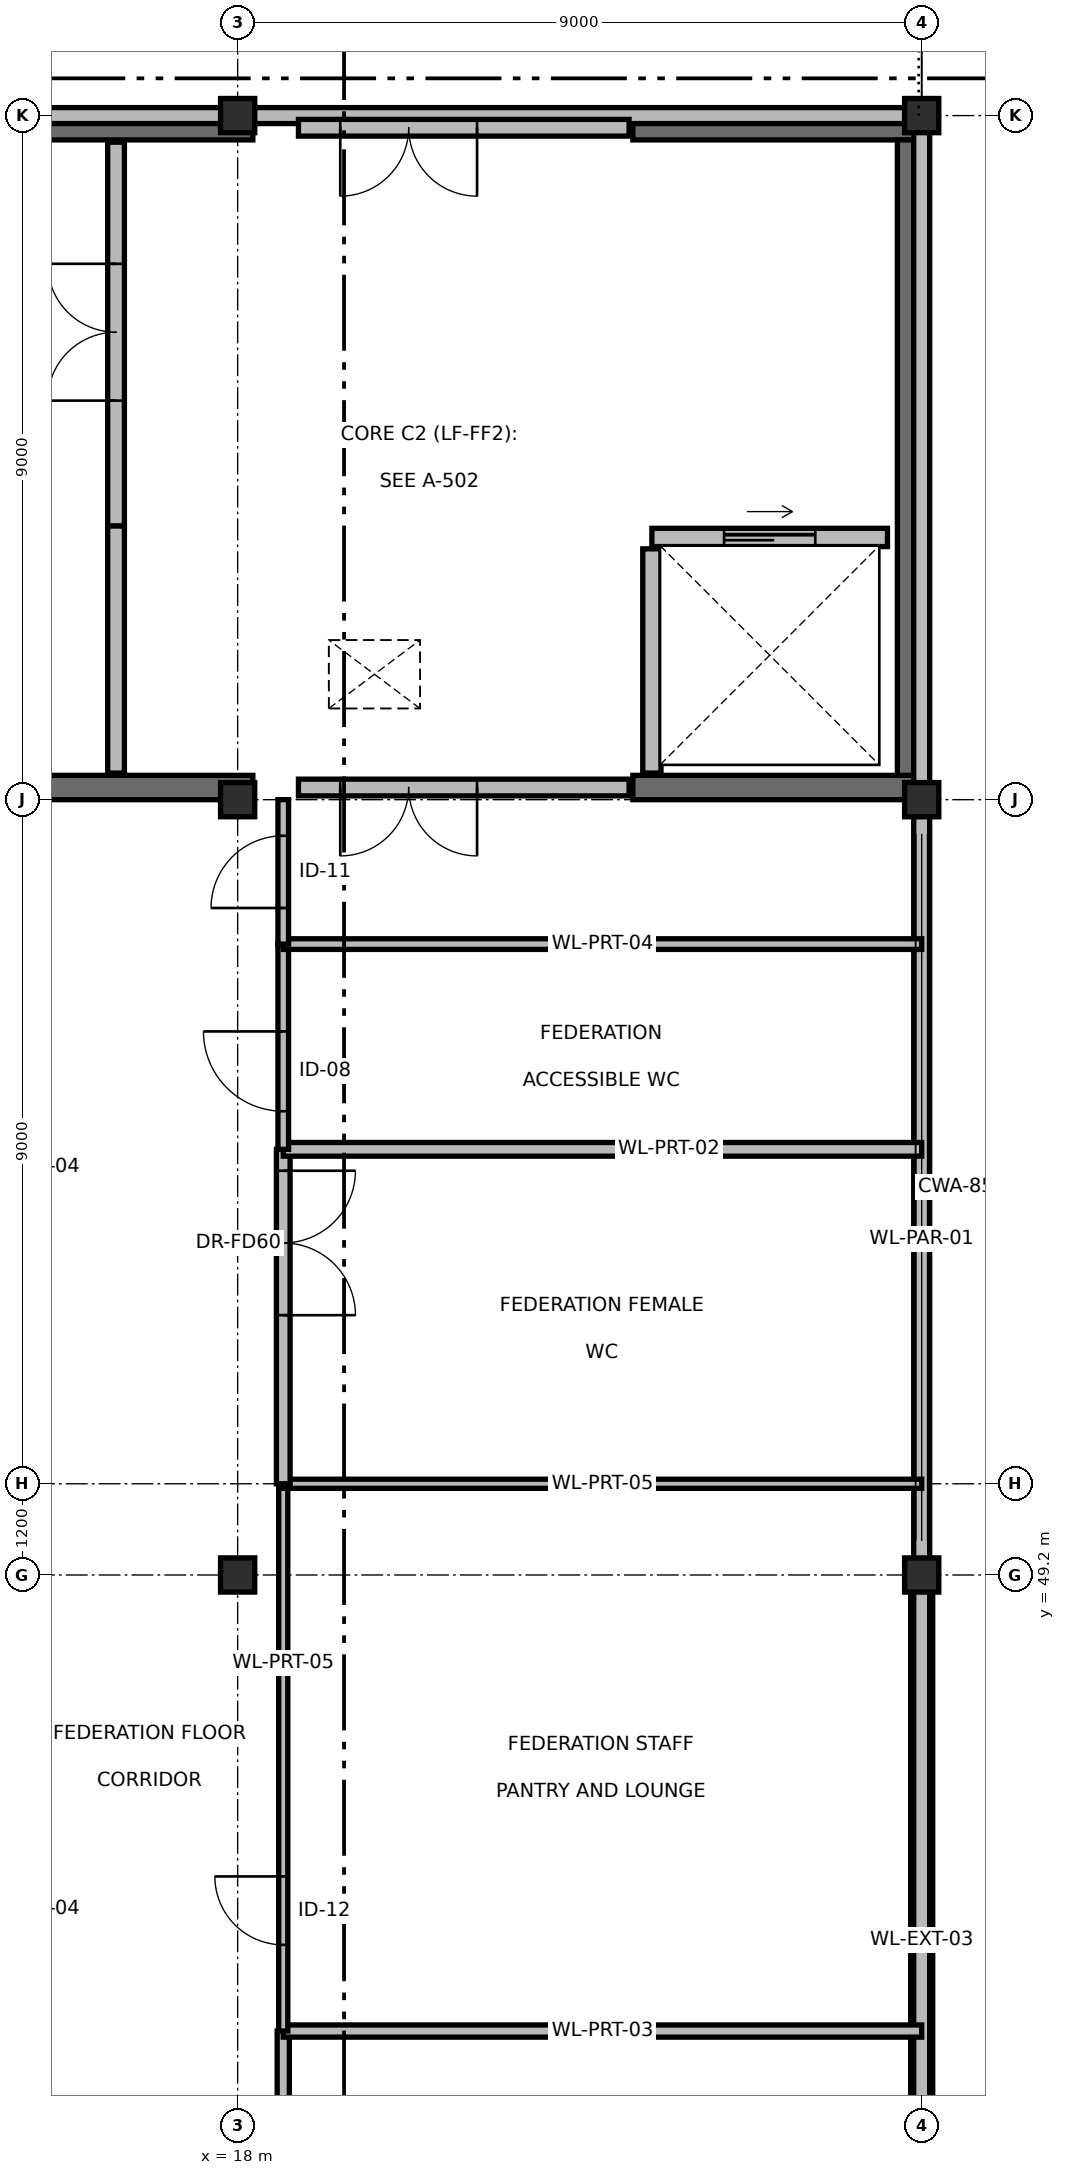
"""IFC4 building model, lengths in metres.
Left out: names, types, materials, properties, quantities, classifications, styles, units other than length and angle.
Written with IfcOpenShell. Run it as: python <this file> out.ifc"""

import sys

from ifc_helpers import new_model, si_unit, direction, frame, frame_2d, origin, origin_2d, place, context, subcontext, project, spatial, rectangle, extrude, element, fill, save


model = new_model("IFC4")
c1 = context("Model", 3, precision=1e-05, world=origin(), true_north=direction((0.0, 1.0)))
c2 = subcontext(c1, "Body", "Model", "MODEL_VIEW")
j1 = project(units=[si_unit("LENGTHUNIT", "METRE"), si_unit("PLANEANGLEUNIT", "RADIAN")], contexts=[c1])
p1 = place(None, origin())
s1 = spatial("IfcSite", under=j1, at=p1, CompositionType="ELEMENT")
p2 = place(p1, origin())
s2 = spatial("IfcBuilding", under=s1, at=p2, CompositionType="ELEMENT")
p3 = place(p2, frame((0.0, 0.0, 18.6)))
s3 = spatial("IfcBuildingStorey", under=s2, at=p3, CompositionType="ELEMENT", Elevation=18.6)
for number, where, z_axis, x_axis in (
    (1, (18.0, 49.2, 0.0), (0.0, 0.0, 1.0), (1.0, 0.0, 0.0)),
    (2, (18.0, 59.4, 0.0), (0.0, 0.0, 1.0), (1.0, 0.0, 0.0)),
    (3, (18.0, 68.4, 0.0), (0.0, 0.0, 1.0), (1.0, 0.0, 0.0)),
    (4, (27.0, 49.2, 0.0), (0.0, 0.0, 1.0), (1.0, 0.0, 0.0)),
    (5, (27.0, 59.4, 0.0), (0.0, 0.0, 1.0), (1.0, 0.0, 0.0)),
    (6, (27.0, 68.4, 0.0), (0.0, 0.0, 1.0), (1.0, 0.0, 0.0)),
):
    element("IfcColumn", number, at=place(p3, frame(where, z_axis=z_axis, x_axis=x_axis)), inside=s3, PredefinedType="COLUMN", context=c2, shape_type="SweptSolid", body=[
        extrude(rectangle(XDim=0.45, YDim=0.45, at=origin_2d()), origin(), (0.0, 0.0, 1.0), 4.2),
    ])
p4 = place(p3, frame((9.0, 59.56, 0.0), z_axis=(0.0, 0.0, 1.0), x_axis=(1.0, 0.0, 0.0)))
e7 = element("IfcWall", 7, at=p4, inside=s3, PredefinedType="SHEAR", context=c2, shape_type="SweptSolid", body=[
    extrude(rectangle(XDim=9.2, YDim=0.32, at=frame_2d((4.6, 0.0))), origin(), (0.0, 0.0, 1.0), 4.2),
])
p5 = place(p3, frame((23.2, 59.56, 0.0), z_axis=(0.0, 0.0, 1.0), x_axis=(1.0, 0.0, 0.0)))
e8 = element("IfcWall", 8, at=p5, inside=s3, PredefinedType="SHEAR", context=c2, shape_type="SweptSolid", body=[
    extrude(rectangle(XDim=3.8, YDim=0.32, at=frame_2d((1.9, 0.0))), origin(), (0.0, 0.0, 1.0), 4.2),
])
p6 = place(p3, frame((9.0, 68.24, 0.0), z_axis=(0.0, 0.0, 1.0), x_axis=(1.0, 0.0, 0.0)))
e9 = element("IfcWall", 9, at=p6, inside=s3, PredefinedType="SHEAR", context=c2, shape_type="SweptSolid", body=[
    extrude(rectangle(XDim=9.2, YDim=0.32, at=frame_2d((4.6, 0.0))), origin(), (0.0, 0.0, 1.0), 4.2),
])
p7 = place(p3, frame((23.2, 68.24, 0.0), z_axis=(0.0, 0.0, 1.0), x_axis=(1.0, 0.0, 0.0)))
e10 = element("IfcWall", 10, at=p7, inside=s3, PredefinedType="SHEAR", context=c2, shape_type="SweptSolid", body=[
    extrude(rectangle(XDim=3.8, YDim=0.32, at=frame_2d((1.9, 0.0))), origin(), (0.0, 0.0, 1.0), 4.2),
])
p8 = place(p3, frame((26.84, 59.72, 0.0), z_axis=(0.0, 0.0, 1.0), x_axis=(0.0, 1.0, 0.0)))
e11 = element("IfcWall", 11, at=p8, inside=s3, PredefinedType="SHEAR", context=c2, shape_type="SweptSolid", body=[
    extrude(rectangle(XDim=8.36, YDim=0.32, at=frame_2d((4.18, 0.0))), origin(), (0.0, 0.0, 1.0), 4.2),
])
p9 = place(p3, frame((27.0, 48.97, 0.0), z_axis=(0.0, 0.0, 1.0), x_axis=(0.0, -1.0, 0.0)))
e12 = element("IfcWall", 12, at=p9, inside=s3, PredefinedType="SOLIDWALL", context=c2, shape_type="SweptSolid", body=[
    extrude(rectangle(XDim=9.14, YDim=0.29, at=frame_2d((4.57, 0.0))), origin(), (0.0, 0.0, 1.0), 3.25),
])
p10 = place(p3, frame((27.0, 4.31, 4.2), z_axis=(0.0, 0.0, 1.0), x_axis=(0.0, 1.0, 0.0)))
e13 = element("IfcWall", 13, at=p10, inside=s3, PredefinedType="PARAPET", context=c2, shape_type="SweptSolid", body=[
    extrude(rectangle(XDim=63.98, YDim=0.21, at=frame_2d((31.99, 0.0))), origin(), (0.0, 0.0, 1.0), 1.15),
])
p11 = place(p3, frame((27.0, 68.4, 4.2), z_axis=(0.0, 0.0, 1.0), x_axis=(-1.0, 0.0, 0.0)))
e14 = element("IfcWall", 14, at=p11, inside=s3, PredefinedType="PARAPET", context=c2, shape_type="SweptSolid", body=[
    extrude(rectangle(XDim=27.0, YDim=0.21, at=frame_2d((13.5, 0.0))), origin(), (0.0, 0.0, 1.0), 1.15),
])
p12 = place(p3, frame((16.4, 68.05, 0.0), z_axis=(0.0, 0.0, 1.0), x_axis=(0.0, -1.0, 0.0)))
e15 = element("IfcWall", 15, at=p12, inside=s3, PredefinedType="PARTITIONING", context=c2, shape_type="SweptSolid", body=[
    extrude(rectangle(XDim=5.05, YDim=0.22, at=frame_2d((2.525, 0.0))), origin(), (0.0, 0.0, 1.0), 3.255),
])
p13 = place(p12, frame((1.6, 0.0, 0.0)))
e16 = element("IfcOpeningElement", 16, at=p13, cuts=e15, PredefinedType="OPENING", context=c2, shape_type="SweptSolid", body=[
    extrude(rectangle(XDim=1.8, YDim=2.2, at=frame_2d((0.9, 1.1))), frame((0.0, 0.12, 0.0), z_axis=(0.0, -1.0, 0.0), x_axis=(1.0, 0.0, 0.0)), (0.0, 0.0, 1.0), 0.24),
])
p14 = place(p3, frame((16.4, 59.75, 0.0), z_axis=(0.0, 0.0, 1.0), x_axis=(0.0, 1.0, 0.0)))
e17 = element("IfcWall", 17, at=p14, inside=s3, PredefinedType="PARTITIONING", context=c2, shape_type="SweptSolid", body=[
    extrude(rectangle(XDim=3.25, YDim=0.22, at=frame_2d((1.625, 0.0))), origin(), (0.0, 0.0, 1.0), 3.305),
])
p15 = place(p3, frame((23.45, 62.85, 0.0), z_axis=(0.0, 0.0, 1.0), x_axis=(1.0, 0.0, 0.0)))
e18 = element("IfcWall", 18, at=p15, inside=s3, PredefinedType="SOLIDWALL", context=c2, shape_type="SweptSolid", body=[
    extrude(rectangle(XDim=3.1, YDim=0.24, at=frame_2d((1.55, 0.0))), origin(), (0.0, 0.0, 1.0), 3.905),
])
p16 = place(p15, frame((0.95, 0.0, 0.0)))
e19 = element("IfcOpeningElement", 19, at=p16, cuts=e18, PredefinedType="OPENING", context=c2, shape_type="SweptSolid", body=[
    extrude(rectangle(XDim=1.2, YDim=2.2, at=frame_2d((0.6, 1.1))), frame((0.0, 0.13, 0.0), z_axis=(0.0, -1.0, 0.0), x_axis=(1.0, 0.0, 0.0)), (0.0, 0.0, 1.0), 0.26),
])
p17 = place(p3, frame((23.45, 59.75, 0.0), z_axis=(0.0, 0.0, 1.0), x_axis=(0.0, 1.0, 0.0)))
e20 = element("IfcWall", 20, at=p17, inside=s3, PredefinedType="SOLIDWALL", context=c2, shape_type="SweptSolid", body=[
    extrude(rectangle(XDim=2.95, YDim=0.24, at=frame_2d((1.475, 0.0))), origin(), (0.0, 0.0, 1.0), 3.305),
])
p18 = place(p3, frame((18.8, 59.56, 0.0), z_axis=(0.0, 0.0, 1.0), x_axis=(1.0, 0.0, 0.0)))
e21 = element("IfcWall", 21, at=p18, inside=s3, PredefinedType="PARTITIONING", context=c2, shape_type="SweptSolid", body=[
    extrude(rectangle(XDim=4.35, YDim=0.22, at=frame_2d((2.175, 0.0))), origin(), (0.0, 0.0, 1.0), 3.305),
])
p19 = place(p18, frame((0.55, 0.0, 0.0)))
e22 = element("IfcOpeningElement", 22, at=p19, cuts=e21, PredefinedType="OPENING", context=c2, shape_type="SweptSolid", body=[
    extrude(rectangle(XDim=1.8, YDim=2.2, at=frame_2d((0.9, 1.1))), frame((0.0, 0.12, 0.0), z_axis=(0.0, -1.0, 0.0), x_axis=(1.0, 0.0, 0.0)), (0.0, 0.0, 1.0), 0.24),
])
p20 = place(p3, frame((18.8, 68.24, 0.0), z_axis=(0.0, 0.0, 1.0), x_axis=(1.0, 0.0, 0.0)))
e23 = element("IfcWall", 23, at=p20, inside=s3, PredefinedType="PARTITIONING", context=c2, shape_type="SweptSolid", body=[
    extrude(rectangle(XDim=4.35, YDim=0.22, at=frame_2d((2.175, 0.0))), origin(), (0.0, 0.0, 1.0), 3.255),
])
p21 = place(p20, frame((0.55, 0.0, 0.0)))
e24 = element("IfcOpeningElement", 24, at=p21, cuts=e23, PredefinedType="OPENING", context=c2, shape_type="SweptSolid", body=[
    extrude(rectangle(XDim=1.8, YDim=2.2, at=frame_2d((0.9, 1.1))), frame((0.0, 0.12, 0.0), z_axis=(0.0, -1.0, 0.0), x_axis=(1.0, 0.0, 0.0)), (0.0, 0.0, 1.0), 0.24),
])
p22 = place(p3, frame((18.6, 25.4, 0.0), z_axis=(0.0, 0.0, 1.0), x_axis=(0.0, 1.0, 0.0)))
e25 = element("IfcWall", 25, at=p22, inside=s3, PredefinedType="PARTITIONING", context=c2, shape_type="SweptSolid", body=[
    extrude(rectangle(XDim=17.8, YDim=0.16, at=frame_2d((8.9, 0.0))), origin(), (0.0, 0.0, 1.0), 3.305),
])
p23 = place(p22, frame((7.95, 0.0, 0.0)))
e26 = element("IfcOpeningElement", 26, at=p23, cuts=e25, PredefinedType="OPENING", context=c2, shape_type="SweptSolid", body=[
    extrude(rectangle(XDim=1.9, YDim=2.2, at=frame_2d((0.95, 1.1))), frame((0.0, 0.09, 0.0), z_axis=(0.0, -1.0, 0.0), x_axis=(1.0, 0.0, 0.0)), (0.0, 0.0, 1.0), 0.18),
])
p24 = place(p3, frame((18.6, 43.2, 0.0), z_axis=(0.0, 0.0, 1.0), x_axis=(1.0, 0.0, 0.0)))
e27 = element("IfcWall", 27, at=p24, inside=s3, PredefinedType="PARTITIONING", context=c2, shape_type="SweptSolid", body=[
    extrude(rectangle(XDim=8.4, YDim=0.16, at=frame_2d((4.2, 0.0))), origin(), (0.0, 0.0, 1.0), 3.255),
])
p25 = place(p3, frame((18.6, 43.2, 0.0), z_axis=(0.0, 0.0, 1.0), x_axis=(0.0, 1.0, 0.0)))
e28 = element("IfcWall", 28, at=p25, inside=s3, PredefinedType="PARTITIONING", context=c2, shape_type="SweptSolid", body=[
    extrude(rectangle(XDim=7.2, YDim=0.12, at=frame_2d((3.6, 0.0))), origin(), (0.0, 0.0, 1.0), 3.305),
])
p26 = place(p25, frame((1.134, 0.0, 0.0)))
e29 = element("IfcOpeningElement", 29, at=p26, cuts=e28, PredefinedType="OPENING", context=c2, shape_type="SweptSolid", body=[
    extrude(rectangle(XDim=0.9, YDim=2.1, at=frame_2d((0.45, 1.05))), frame((0.0, 0.07, 0.0), z_axis=(0.0, -1.0, 0.0), x_axis=(1.0, 0.0, 0.0)), (0.0, 0.0, 1.0), 0.14),
])
p27 = place(p3, frame((18.6, 50.4, 0.0), z_axis=(0.0, 0.0, 1.0), x_axis=(1.0, 0.0, 0.0)))
e30 = element("IfcWall", 30, at=p27, inside=s3, PredefinedType="PARTITIONING", context=c2, shape_type="SweptSolid", body=[
    extrude(rectangle(XDim=8.4, YDim=0.12, at=frame_2d((4.2, 0.0))), origin(), (0.0, 0.0, 1.0), 3.255),
])
p28 = place(p3, frame((18.6, 50.4, 0.0), z_axis=(0.0, 0.0, 1.0), x_axis=(0.0, 1.0, 0.0)))
e31 = element("IfcWall", 31, at=p28, inside=s3, PredefinedType="PARTITIONING", context=c2, shape_type="SweptSolid", body=[
    extrude(rectangle(XDim=4.4, YDim=0.18, at=frame_2d((2.2, 0.0))), origin(), (0.0, 0.0, 1.0), 3.653),
])
p29 = place(p28, frame((2.218, 0.0, 0.0)))
e32 = element("IfcOpeningElement", 32, at=p29, cuts=e31, PredefinedType="OPENING", context=c2, shape_type="SweptSolid", body=[
    extrude(rectangle(XDim=1.9, YDim=2.2, at=frame_2d((0.95, 1.1))), frame((0.0, 0.1, 0.0), z_axis=(0.0, -1.0, 0.0), x_axis=(1.0, 0.0, 0.0)), (0.0, 0.0, 1.0), 0.2),
])
p30 = place(p3, frame((18.6, 54.8, 0.0), z_axis=(0.0, 0.0, 1.0), x_axis=(1.0, 0.0, 0.0)))
e33 = element("IfcWall", 33, at=p30, inside=s3, PredefinedType="PARTITIONING", context=c2, shape_type="SweptSolid", body=[
    extrude(rectangle(XDim=8.4, YDim=0.18, at=frame_2d((4.2, 0.0))), origin(), (0.0, 0.0, 1.0), 3.255),
])
p31 = place(p3, frame((18.6, 54.8, 0.0), z_axis=(0.0, 0.0, 1.0), x_axis=(0.0, 1.0, 0.0)))
e34 = element("IfcWall", 34, at=p31, inside=s3, PredefinedType="PARTITIONING", context=c2, shape_type="SweptSolid", body=[
    extrude(rectangle(XDim=2.7, YDim=0.14, at=frame_2d((1.35, 0.0))), origin(), (0.0, 0.0, 1.0), 3.905),
])
p32 = place(p31, frame((0.501, 0.0, 0.0)))
e35 = element("IfcOpeningElement", 35, at=p32, cuts=e34, PredefinedType="OPENING", context=c2, shape_type="SweptSolid", body=[
    extrude(rectangle(XDim=1.05, YDim=2.2, at=frame_2d((0.525, 1.1))), frame((0.0, 0.08, 0.0), z_axis=(0.0, -1.0, 0.0), x_axis=(1.0, 0.0, 0.0)), (0.0, 0.0, 1.0), 0.16),
])
p33 = place(p3, frame((18.6, 57.5, 0.0), z_axis=(0.0, 0.0, 1.0), x_axis=(1.0, 0.0, 0.0)))
e36 = element("IfcWall", 36, at=p33, inside=s3, PredefinedType="PARTITIONING", context=c2, shape_type="SweptSolid", body=[
    extrude(rectangle(XDim=8.4, YDim=0.14, at=frame_2d((4.2, 0.0))), origin(), (0.0, 0.0, 1.0), 3.255),
])
p34 = place(p3, frame((18.6, 57.5, 0.0), z_axis=(0.0, 0.0, 1.0), x_axis=(0.0, 1.0, 0.0)))
e37 = element("IfcWall", 37, at=p34, inside=s3, PredefinedType="PARTITIONING", context=c2, shape_type="SweptSolid", body=[
    extrude(rectangle(XDim=1.9, YDim=0.14, at=frame_2d((0.95, 0.0))), origin(), (0.0, 0.0, 1.0), 3.305),
])
p35 = place(p34, frame((0.475, 0.0, 0.0)))
e38 = element("IfcOpeningElement", 38, at=p35, cuts=e37, PredefinedType="OPENING", context=c2, shape_type="SweptSolid", body=[
    extrude(rectangle(XDim=0.95, YDim=2.1, at=frame_2d((0.475, 1.05))), frame((0.0, 0.08, 0.0), z_axis=(0.0, -1.0, 0.0), x_axis=(1.0, 0.0, 0.0)), (0.0, 0.0, 1.0), 0.16),
])
p36 = place(p13, origin())
e39 = element("IfcDoor", 39, at=p36, inside=s3, OperationType="DOUBLE_DOOR_SINGLE_SWING", PredefinedType="DOOR", context=c2, shape_type="SweptSolid", body=[
    extrude(rectangle(XDim=1.8, YDim=2.2, at=frame_2d((0.9, 1.1))), frame((0.0, 0.025, 0.0), z_axis=(0.0, -1.0, 0.0), x_axis=(1.0, 0.0, 0.0)), (0.0, 0.0, 1.0), 0.05),
])
fill(e16, e39)
p37 = place(p16, origin())
e40 = element("IfcDoor", 40, at=p37, inside=s3, OperationType="DOUBLE_DOOR_SLIDING", PredefinedType="DOOR", context=c2, shape_type="SweptSolid", body=[
    extrude(rectangle(XDim=1.2, YDim=2.2, at=frame_2d((0.6, 1.1))), frame((0.0, 0.025, 0.0), z_axis=(0.0, -1.0, 0.0), x_axis=(1.0, 0.0, 0.0)), (0.0, 0.0, 1.0), 0.05),
])
fill(e19, e40)
p38 = place(p19, origin())
e41 = element("IfcDoor", 41, at=p38, inside=s3, OperationType="DOUBLE_DOOR_SINGLE_SWING", PredefinedType="DOOR", context=c2, shape_type="SweptSolid", body=[
    extrude(rectangle(XDim=1.8, YDim=2.2, at=frame_2d((0.9, 1.1))), frame((0.0, 0.025, 0.0), z_axis=(0.0, -1.0, 0.0), x_axis=(1.0, 0.0, 0.0)), (0.0, 0.0, 1.0), 0.05),
])
fill(e22, e41)
p39 = place(p21, origin())
e42 = element("IfcDoor", 42, at=p39, inside=s3, OperationType="DOUBLE_DOOR_SINGLE_SWING", PredefinedType="DOOR", context=c2, shape_type="SweptSolid", body=[
    extrude(rectangle(XDim=1.8, YDim=2.2, at=frame_2d((0.9, 1.1))), frame((0.0, 0.025, 0.0), z_axis=(0.0, -1.0, 0.0), x_axis=(1.0, 0.0, 0.0)), (0.0, 0.0, 1.0), 0.05),
])
fill(e24, e42)
p40 = place(p26, origin())
e43 = element("IfcDoor", 43, at=p40, inside=s3, OperationType="SINGLE_SWING_RIGHT", PredefinedType="DOOR", context=c2, shape_type="SweptSolid", body=[
    extrude(rectangle(XDim=0.9, YDim=2.1, at=frame_2d((0.45, 1.05))), frame((0.0, 0.025, 0.0), z_axis=(0.0, -1.0, 0.0), x_axis=(1.0, 0.0, 0.0)), (0.0, 0.0, 1.0), 0.05),
])
fill(e29, e43)
p41 = place(p29, origin())
e44 = element("IfcDoor", 44, at=p41, inside=s3, OperationType="DOUBLE_DOOR_SINGLE_SWING", PredefinedType="DOOR", context=c2, shape_type="SweptSolid", body=[
    extrude(rectangle(XDim=1.9, YDim=2.2, at=frame_2d((0.95, 1.1))), frame((0.0, 0.025, 0.0), z_axis=(0.0, -1.0, 0.0), x_axis=(1.0, 0.0, 0.0)), (0.0, 0.0, 1.0), 0.05),
])
fill(e32, e44)
p42 = place(p32, origin())
e45 = element("IfcDoor", 45, at=p42, inside=s3, OperationType="SINGLE_SWING_RIGHT", PredefinedType="DOOR", context=c2, shape_type="SweptSolid", body=[
    extrude(rectangle(XDim=1.05, YDim=2.2, at=frame_2d((0.525, 1.1))), frame((0.0, 0.025, 0.0), z_axis=(0.0, -1.0, 0.0), x_axis=(1.0, 0.0, 0.0)), (0.0, 0.0, 1.0), 0.05),
])
fill(e35, e45)
p43 = place(p35, origin())
e46 = element("IfcDoor", 46, at=p43, inside=s3, OperationType="SINGLE_SWING_LEFT", PredefinedType="DOOR", context=c2, shape_type="SweptSolid", body=[
    extrude(rectangle(XDim=0.95, YDim=2.1, at=frame_2d((0.475, 1.05))), frame((0.0, 0.025, 0.0), z_axis=(0.0, -1.0, 0.0), x_axis=(1.0, 0.0, 0.0)), (0.0, 0.0, 1.0), 0.05),
])
fill(e38, e46)
save(model, sys.argv[1])
